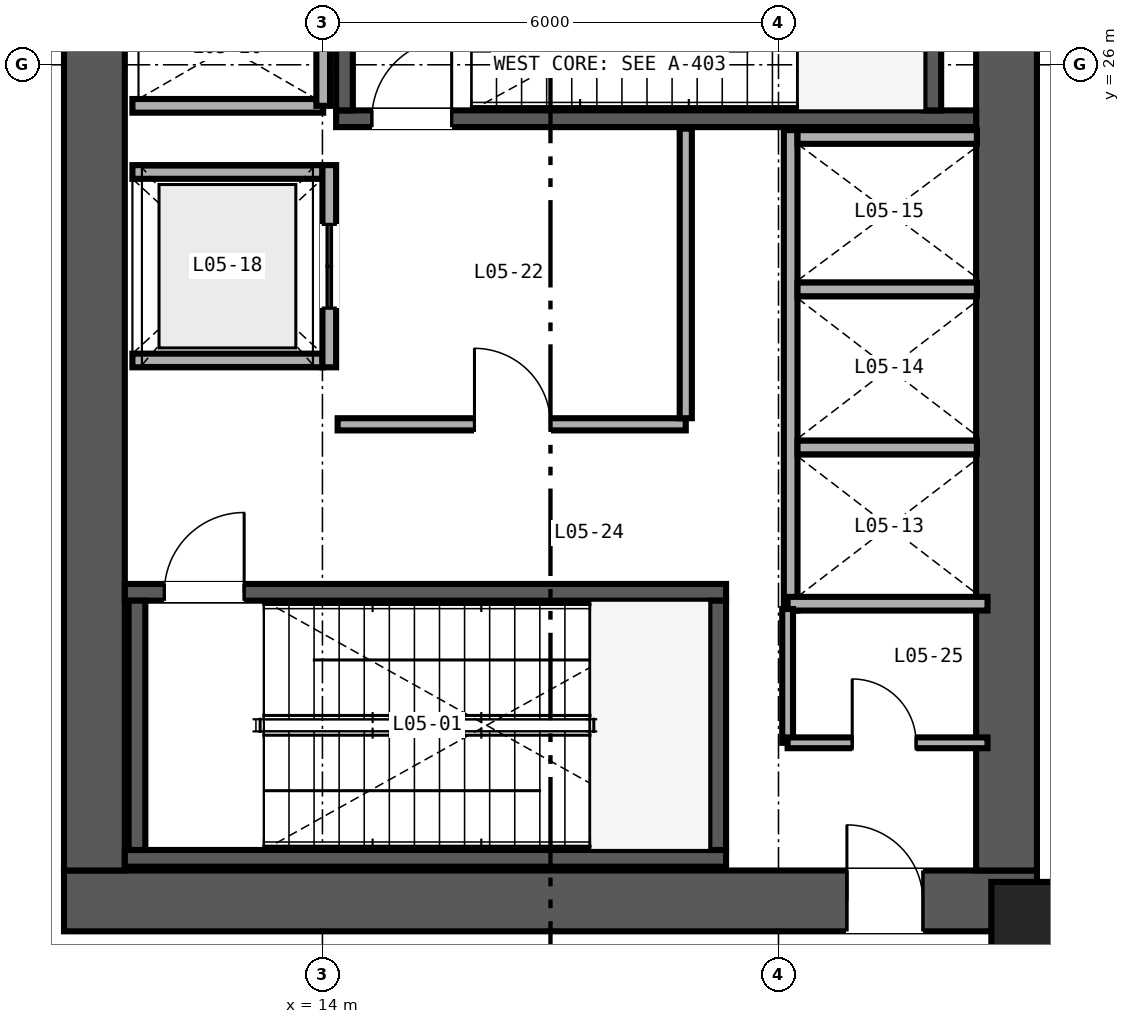
"""IFC4 building model, lengths in metres.
Left out: names, types, materials, properties, quantities, classifications, styles, units other than length and angle.
Written with IfcOpenShell. Run it as: python <this file> out.ifc"""

import sys

from ifc_helpers import new_model, si_unit, direction, frame, frame_2d, origin, origin_2d, place, context, subcontext, project, spatial, rectangle, extrude, source, transform, mapped, element, fill, save


model = new_model("IFC4")
c1 = context("Model", 3, precision=1e-05, world=origin(), true_north=direction((0.0, 1.0)))
c2 = subcontext(c1, "Body", "Model", "MODEL_VIEW")
j1 = project(units=[si_unit("LENGTHUNIT", "METRE"), si_unit("PLANEANGLEUNIT", "RADIAN")], contexts=[c1])
p1 = place(None, origin())
s1 = spatial("IfcSite", under=j1, at=p1, CompositionType="ELEMENT")
p2 = place(p1, origin())
s2 = spatial("IfcBuilding", under=s1, at=p2, CompositionType="ELEMENT")
p3 = place(p2, frame((0.0, 0.0, 24.0)))
s3 = spatial("IfcBuildingStorey", under=s2, at=p3, CompositionType="ELEMENT", Elevation=24.0)
p4 = place(p3, frame((10.6, 15.0, 0.0), z_axis=(0.0, 0.0, 1.0), x_axis=(1.0, 0.0, 0.0)))
e1 = element("IfcWall", 1, at=p4, inside=s3, PredefinedType="SHEAR", context=c2, shape_type="SweptSolid", body=[
    extrude(rectangle(XDim=12.8, YDim=0.8, at=frame_2d((6.4, 0.0))), origin(), (0.0, 0.0, 1.0), 4.48),
])
p5 = place(p4, frame((10.3, 0.0, 0.0)))
e2 = element("IfcOpeningElement", 2, at=p5, cuts=e1, PredefinedType="OPENING", context=c2, shape_type="SweptSolid", body=[
    extrude(rectangle(XDim=1.0, YDim=2.15, at=frame_2d((0.5, 1.075))), frame((0.0, 0.41, 0.0), z_axis=(0.0, -1.0, 0.0), x_axis=(1.0, 0.0, 0.0)), (0.0, 0.0, 1.0), 0.82),
])
for number, where, z_axis, x_axis in (
    (3, (11.0, 15.4, 0.0), (0.0, 0.0, 1.0), (0.0, 1.0, 0.0)),
    (4, (23.0, 15.4, 0.0), (0.0, 0.0, 1.0), (0.0, 1.0, 0.0)),
):
    element("IfcWall", number, at=place(p3, frame(where, z_axis=z_axis, x_axis=x_axis)), inside=s3, PredefinedType="SHEAR", context=c2, shape_type="SweptSolid", body=[
        extrude(rectangle(XDim=21.2, YDim=0.8, at=frame_2d((10.6, 0.0))), origin(), (0.0, 0.0, 1.0), 4.48),
    ])
p6 = place(p3, frame((11.4, 15.56, 0.0), z_axis=(0.0, 0.0, 1.0), x_axis=(1.0, 0.0, 0.0)))
e5 = element("IfcWall", 5, at=p6, inside=s3, PredefinedType="SHEAR", context=c2, shape_type="SweptSolid", body=[
    extrude(rectangle(XDim=7.91, YDim=0.22, at=frame_2d((3.955, 0.0))), origin(), (0.0, 0.0, 1.0), 4.6),
])
p7 = place(p3, frame((11.4, 19.06, 0.0), z_axis=(0.0, 0.0, 1.0), x_axis=(1.0, 0.0, 0.0)))
e6 = element("IfcWall", 6, at=p7, inside=s3, PredefinedType="SHEAR", context=c2, shape_type="SweptSolid", body=[
    extrude(rectangle(XDim=7.91, YDim=0.22, at=frame_2d((3.955, 0.0))), origin(), (0.0, 0.0, 1.0), 4.6),
])
p8 = place(p7, frame((0.52, 0.0, 0.0)))
e7 = element("IfcOpeningElement", 7, at=p8, cuts=e6, PredefinedType="OPENING", context=c2, shape_type="SweptSolid", body=[
    extrude(rectangle(XDim=1.05, YDim=2.15, at=frame_2d((0.525, 1.075))), frame((0.0, 0.12, 0.0), z_axis=(0.0, -1.0, 0.0), x_axis=(1.0, 0.0, 0.0)), (0.0, 0.0, 1.0), 0.24),
])
for number, where, z_axis, x_axis in (
    (8, (11.56, 15.67, 0.0), (0.0, 0.0, 1.0), (0.0, 1.0, 0.0)),
    (9, (19.2, 15.67, 0.0), (0.0, 0.0, 1.0), (0.0, 1.0, 0.0)),
):
    element("IfcWall", number, at=place(p3, frame(where, z_axis=z_axis, x_axis=x_axis)), inside=s3, PredefinedType="SHEAR", context=c2, shape_type="SweptSolid", body=[
        extrude(rectangle(XDim=3.28, YDim=0.22, at=frame_2d((1.64, 0.0))), origin(), (0.0, 0.0, 1.0), 4.6),
    ])
p9 = place(p3, frame((14.18, 25.29, 0.0), z_axis=(0.0, 0.0, 1.0), x_axis=(1.0, 0.0, 0.0)))
e10 = element("IfcWall", 10, at=p9, inside=s3, PredefinedType="SHEAR", context=c2, shape_type="SweptSolid", body=[
    extrude(rectangle(XDim=8.42, YDim=0.22, at=frame_2d((4.21, 0.0))), origin(), (0.0, 0.0, 1.0), 4.6),
])
p10 = place(p9, frame((0.47, 0.0, 0.0)))
e11 = element("IfcOpeningElement", 11, at=p10, cuts=e10, PredefinedType="OPENING", context=c2, shape_type="SweptSolid", body=[
    extrude(rectangle(XDim=1.05, YDim=2.15, at=frame_2d((0.525, 1.075))), frame((0.0, 0.12, 0.0), z_axis=(0.0, -1.0, 0.0), x_axis=(1.0, 0.0, 0.0)), (0.0, 0.0, 1.0), 0.24),
])
for number, where, z_axis, x_axis in (
    (12, (14.29, 25.4, 0.0), (0.0, 0.0, 1.0), (0.0, 1.0, 0.0)),
    (13, (22.03, 25.4, 0.0), (0.0, 0.0, 1.0), (0.0, 1.0, 0.0)),
):
    element("IfcWall", number, at=place(p3, frame(where, z_axis=z_axis, x_axis=x_axis)), inside=s3, PredefinedType="SHEAR", context=c2, shape_type="SweptSolid", body=[
        extrude(rectangle(XDim=3.28, YDim=0.22, at=frame_2d((1.64, 0.0))), origin(), (0.0, 0.0, 1.0), 4.6),
    ])
m1 = source(origin(), c2, "Body", "SweptSolid", [
    extrude(rectangle(XDim=1.4, YDim=1.4, at=origin_2d()), origin(), (0.0, 0.0, 1.0), 4.48),
])
p11 = place(p3, frame((23.5, 14.55, 0.0), z_axis=(0.0, 0.0, 1.0), x_axis=(1.0, 0.0, 0.0)))
e14 = element("IfcColumn", 14, at=p11, inside=s3, PredefinedType="COLUMN", context=c2, shape_type="MappedRepresentation", body=[
    mapped(m1, transform((0.0, 0.0, 0.0), scale=1.0)),
])
p12 = place(p3, frame((20.16, 18.82, 0.0), z_axis=(0.0, 0.0, 1.0), x_axis=(0.0, 1.0, 0.0)))
e15 = element("IfcWall", 15, at=p12, inside=s3, PredefinedType="SOLIDWALL", context=c2, shape_type="SweptSolid", body=[
    extrude(rectangle(XDim=6.32, YDim=0.18, at=frame_2d((3.16, 0.0))), origin(), (0.0, 0.0, 1.0), 3.38),
])
p13 = place(p3, frame((20.12, 18.91, 0.0), z_axis=(0.0, 0.0, 1.0), x_axis=(1.0, 0.0, 0.0)))
e16 = element("IfcWall", 16, at=p13, inside=s3, PredefinedType="SOLIDWALL", context=c2, shape_type="SweptSolid", body=[
    extrude(rectangle(XDim=2.63, YDim=0.18, at=frame_2d((1.315, 0.0))), origin(), (0.0, 0.0, 1.0), 4.48),
])
p14 = place(p3, frame((20.25, 25.05, 0.0), z_axis=(0.0, 0.0, 1.0), x_axis=(1.0, 0.0, 0.0)))
e17 = element("IfcWall", 17, at=p14, inside=s3, PredefinedType="SOLIDWALL", context=c2, shape_type="SweptSolid", body=[
    extrude(rectangle(XDim=2.36, YDim=0.18, at=frame_2d((1.18, 0.0))), origin(), (0.0, 0.0, 1.0), 4.48),
])
p15 = place(p3, frame((20.25, 20.965, 0.0), z_axis=(0.0, 0.0, 1.0), x_axis=(1.0, 0.0, 0.0)))
e18 = element("IfcWall", 18, at=p15, inside=s3, PredefinedType="SOLIDWALL", context=c2, shape_type="SweptSolid", body=[
    extrude(rectangle(XDim=2.36, YDim=0.18, at=frame_2d((1.18, 0.0))), origin(), (0.0, 0.0, 1.0), 3.38),
])
p16 = place(p3, frame((20.25, 23.045, 0.0), z_axis=(0.0, 0.0, 1.0), x_axis=(1.0, 0.0, 0.0)))
e19 = element("IfcWall", 19, at=p16, inside=s3, PredefinedType="SOLIDWALL", context=c2, shape_type="SweptSolid", body=[
    extrude(rectangle(XDim=2.36, YDim=0.18, at=frame_2d((1.18, 0.0))), origin(), (0.0, 0.0, 1.0), 4.48),
])
for number, where, z_axis, x_axis in (
    (20, (11.5, 22.11, 0.0), (0.0, 0.0, 1.0), (1.0, 0.0, 0.0)),
    (21, (11.5, 24.59, 0.0), (0.0, 0.0, 1.0), (1.0, 0.0, 0.0)),
):
    element("IfcWall", number, at=place(p3, frame(where, z_axis=z_axis, x_axis=x_axis)), inside=s3, PredefinedType="SOLIDWALL", context=c2, shape_type="SweptSolid", body=[
        extrude(rectangle(XDim=2.5, YDim=0.18, at=frame_2d((1.25, 0.0))), origin(), (0.0, 0.0, 1.0), 4.48),
    ])
p17 = place(p3, frame((14.09, 22.02, 0.0), z_axis=(0.0, 0.0, 1.0), x_axis=(0.0, 1.0, 0.0)))
e22 = element("IfcWall", 22, at=p17, inside=s3, PredefinedType="SOLIDWALL", context=c2, shape_type="SweptSolid", body=[
    extrude(rectangle(XDim=2.66, YDim=0.18, at=frame_2d((1.33, 0.0))), origin(), (0.0, 0.0, 1.0), 4.48),
])
p18 = place(p17, frame((0.78, 0.0, 0.0)))
e23 = element("IfcOpeningElement", 23, at=p18, cuts=e22, PredefinedType="OPENING", context=c2, shape_type="SweptSolid", body=[
    extrude(rectangle(XDim=1.1, YDim=2.2, at=frame_2d((0.55, 1.1))), frame((0.0, 0.1, 0.0), z_axis=(0.0, -1.0, 0.0), x_axis=(1.0, 0.0, 0.0)), (0.0, 0.0, 1.0), 0.2),
])
p19 = place(p3, frame((11.5, 25.46, 0.0), z_axis=(0.0, 0.0, 1.0), x_axis=(1.0, 0.0, 0.0)))
e24 = element("IfcWall", 24, at=p19, inside=s3, PredefinedType="SOLIDWALL", context=c2, shape_type="SweptSolid", body=[
    extrude(rectangle(XDim=2.51, YDim=0.18, at=frame_2d((1.255, 0.0))), origin(), (0.0, 0.0, 1.0), 4.48),
])
p20 = place(p3, frame((14.01, 25.46, 0.0), z_axis=(0.0, 0.0, 1.0), x_axis=(0.0, 1.0, 0.0)))
e25 = element("IfcWall", 25, at=p20, inside=s3, PredefinedType="SOLIDWALL", context=c2, shape_type="SweptSolid", body=[
    extrude(rectangle(XDim=3.08, YDim=0.18, at=frame_2d((1.54, 0.0))), origin(), (0.0, 0.0, 1.0), 4.48),
])
p21 = place(p3, frame((14.2, 21.27, 0.0), z_axis=(0.0, 0.0, 1.0), x_axis=(1.0, 0.0, 0.0)))
e26 = element("IfcWall", 26, at=p21, inside=s3, PredefinedType="PARTITIONING", context=c2, shape_type="SweptSolid", body=[
    extrude(rectangle(XDim=4.58, YDim=0.16, at=frame_2d((2.29, 0.0))), origin(), (0.0, 0.0, 1.0), 4.48),
])
p22 = place(p21, frame((1.8, 0.0, 0.0)))
e27 = element("IfcOpeningElement", 27, at=p22, cuts=e26, PredefinedType="OPENING", context=c2, shape_type="SweptSolid", body=[
    extrude(rectangle(XDim=1.0, YDim=2.15, at=frame_2d((0.5, 1.075))), frame((0.0, 0.09, 0.0), z_axis=(0.0, -1.0, 0.0), x_axis=(1.0, 0.0, 0.0)), (0.0, 0.0, 1.0), 0.18),
])
p23 = place(p3, frame((18.78, 21.35, 0.0), z_axis=(0.0, 0.0, 1.0), x_axis=(0.0, 1.0, 0.0)))
e28 = element("IfcWall", 28, at=p23, inside=s3, PredefinedType="PARTITIONING", context=c2, shape_type="SweptSolid", body=[
    extrude(rectangle(XDim=3.81, YDim=0.16, at=frame_2d((1.905, 0.0))), origin(), (0.0, 0.0, 1.0), 4.48),
])
p24 = place(p3, frame((20.12, 17.08, 0.0), z_axis=(0.0, 0.0, 1.0), x_axis=(0.0, 1.0, 0.0)))
e29 = element("IfcWall", 29, at=p24, inside=s3, PredefinedType="PARTITIONING", context=c2, shape_type="SweptSolid", body=[
    extrude(rectangle(XDim=1.76, YDim=0.142, at=frame_2d((0.88, 0.0))), origin(), (0.0, 0.0, 1.0), 4.48),
])
p25 = place(p3, frame((20.12, 17.08, 0.0), z_axis=(0.0, 0.0, 1.0), x_axis=(1.0, 0.0, 0.0)))
e30 = element("IfcWall", 30, at=p25, inside=s3, PredefinedType="PARTITIONING", context=c2, shape_type="SweptSolid", body=[
    extrude(rectangle(XDim=2.63, YDim=0.142, at=frame_2d((1.315, 0.0))), origin(), (0.0, 0.0, 1.0), 4.48),
])
p26 = place(p25, frame((0.85, 0.0, 0.0)))
e31 = element("IfcOpeningElement", 31, at=p26, cuts=e30, PredefinedType="OPENING", context=c2, shape_type="SweptSolid", body=[
    extrude(rectangle(XDim=0.84, YDim=2.1, at=frame_2d((0.42, 1.05))), frame((0.0, 0.081, 0.0), z_axis=(0.0, -1.0, 0.0), x_axis=(1.0, 0.0, 0.0)), (0.0, 0.0, 1.0), 0.162),
])
m2 = source(origin(), c2, "Body", "SweptSolid", [
    extrude(rectangle(XDim=1.05, YDim=2.15, at=frame_2d((0.525, 1.075))), frame((0.0, 0.025, 0.0), z_axis=(0.0, -1.0, 0.0), x_axis=(1.0, 0.0, 0.0)), (0.0, 0.0, 1.0), 0.05),
])
p27 = place(p8, origin())
e32 = element("IfcDoor", 32, at=p27, inside=s3, OperationType="SINGLE_SWING_RIGHT", PredefinedType="DOOR", context=c2, shape_type="MappedRepresentation", body=[
    mapped(m2, transform((0.0, 0.0, 0.0), scale=1.0)),
])
fill(e7, e32)
p28 = place(p10, origin())
e33 = element("IfcDoor", 33, at=p28, inside=s3, OperationType="SINGLE_SWING_RIGHT", PredefinedType="DOOR", context=c2, shape_type="MappedRepresentation", body=[
    mapped(m2, transform((0.0, 0.0, 0.0), scale=1.0)),
])
fill(e11, e33)
m3 = source(origin(), c2, "Body", "SweptSolid", [
    extrude(rectangle(XDim=1.1, YDim=2.2, at=frame_2d((0.55, 1.1))), frame((0.0, 0.025, 0.0), z_axis=(0.0, -1.0, 0.0), x_axis=(1.0, 0.0, 0.0)), (0.0, 0.0, 1.0), 0.05),
])
p29 = place(p18, origin())
e34 = element("IfcDoor", 34, at=p29, inside=s3, OperationType="DOUBLE_DOOR_SLIDING", PredefinedType="DOOR", context=c2, shape_type="MappedRepresentation", body=[
    mapped(m3, transform((0.0, 0.0, 0.0), scale=1.0)),
])
fill(e23, e34)
m4 = source(origin(), c2, "Body", "SweptSolid", [
    extrude(rectangle(XDim=1.0, YDim=2.15, at=frame_2d((0.5, 1.075))), frame((0.0, 0.025, 0.0), z_axis=(0.0, -1.0, 0.0), x_axis=(1.0, 0.0, 0.0)), (0.0, 0.0, 1.0), 0.05),
])
p30 = place(p22, origin())
e35 = element("IfcDoor", 35, at=p30, inside=s3, OperationType="SINGLE_SWING_LEFT", PredefinedType="DOOR", context=c2, shape_type="MappedRepresentation", body=[
    mapped(m4, transform((0.0, 0.0, 0.0), scale=1.0)),
])
fill(e27, e35)
m5 = source(origin(), c2, "Body", "SweptSolid", [
    extrude(rectangle(XDim=0.84, YDim=2.1, at=frame_2d((0.42, 1.05))), frame((0.0, 0.025, 0.0), z_axis=(0.0, -1.0, 0.0), x_axis=(1.0, 0.0, 0.0)), (0.0, 0.0, 1.0), 0.05),
])
p31 = place(p26, origin())
e36 = element("IfcDoor", 36, at=p31, inside=s3, OperationType="SINGLE_SWING_LEFT", PredefinedType="DOOR", context=c2, shape_type="MappedRepresentation", body=[
    mapped(m5, transform((0.0, 0.0, 0.0), scale=1.0)),
])
fill(e31, e36)
p32 = place(p5, origin())
e37 = element("IfcDoor", 37, at=p32, inside=s3, OperationType="SINGLE_SWING_LEFT", PredefinedType="DOOR", context=c2, shape_type="MappedRepresentation", body=[
    mapped(m4, transform((0.0, 0.0, 0.0), scale=1.0)),
])
fill(e2, e37)
save(model, sys.argv[1])
